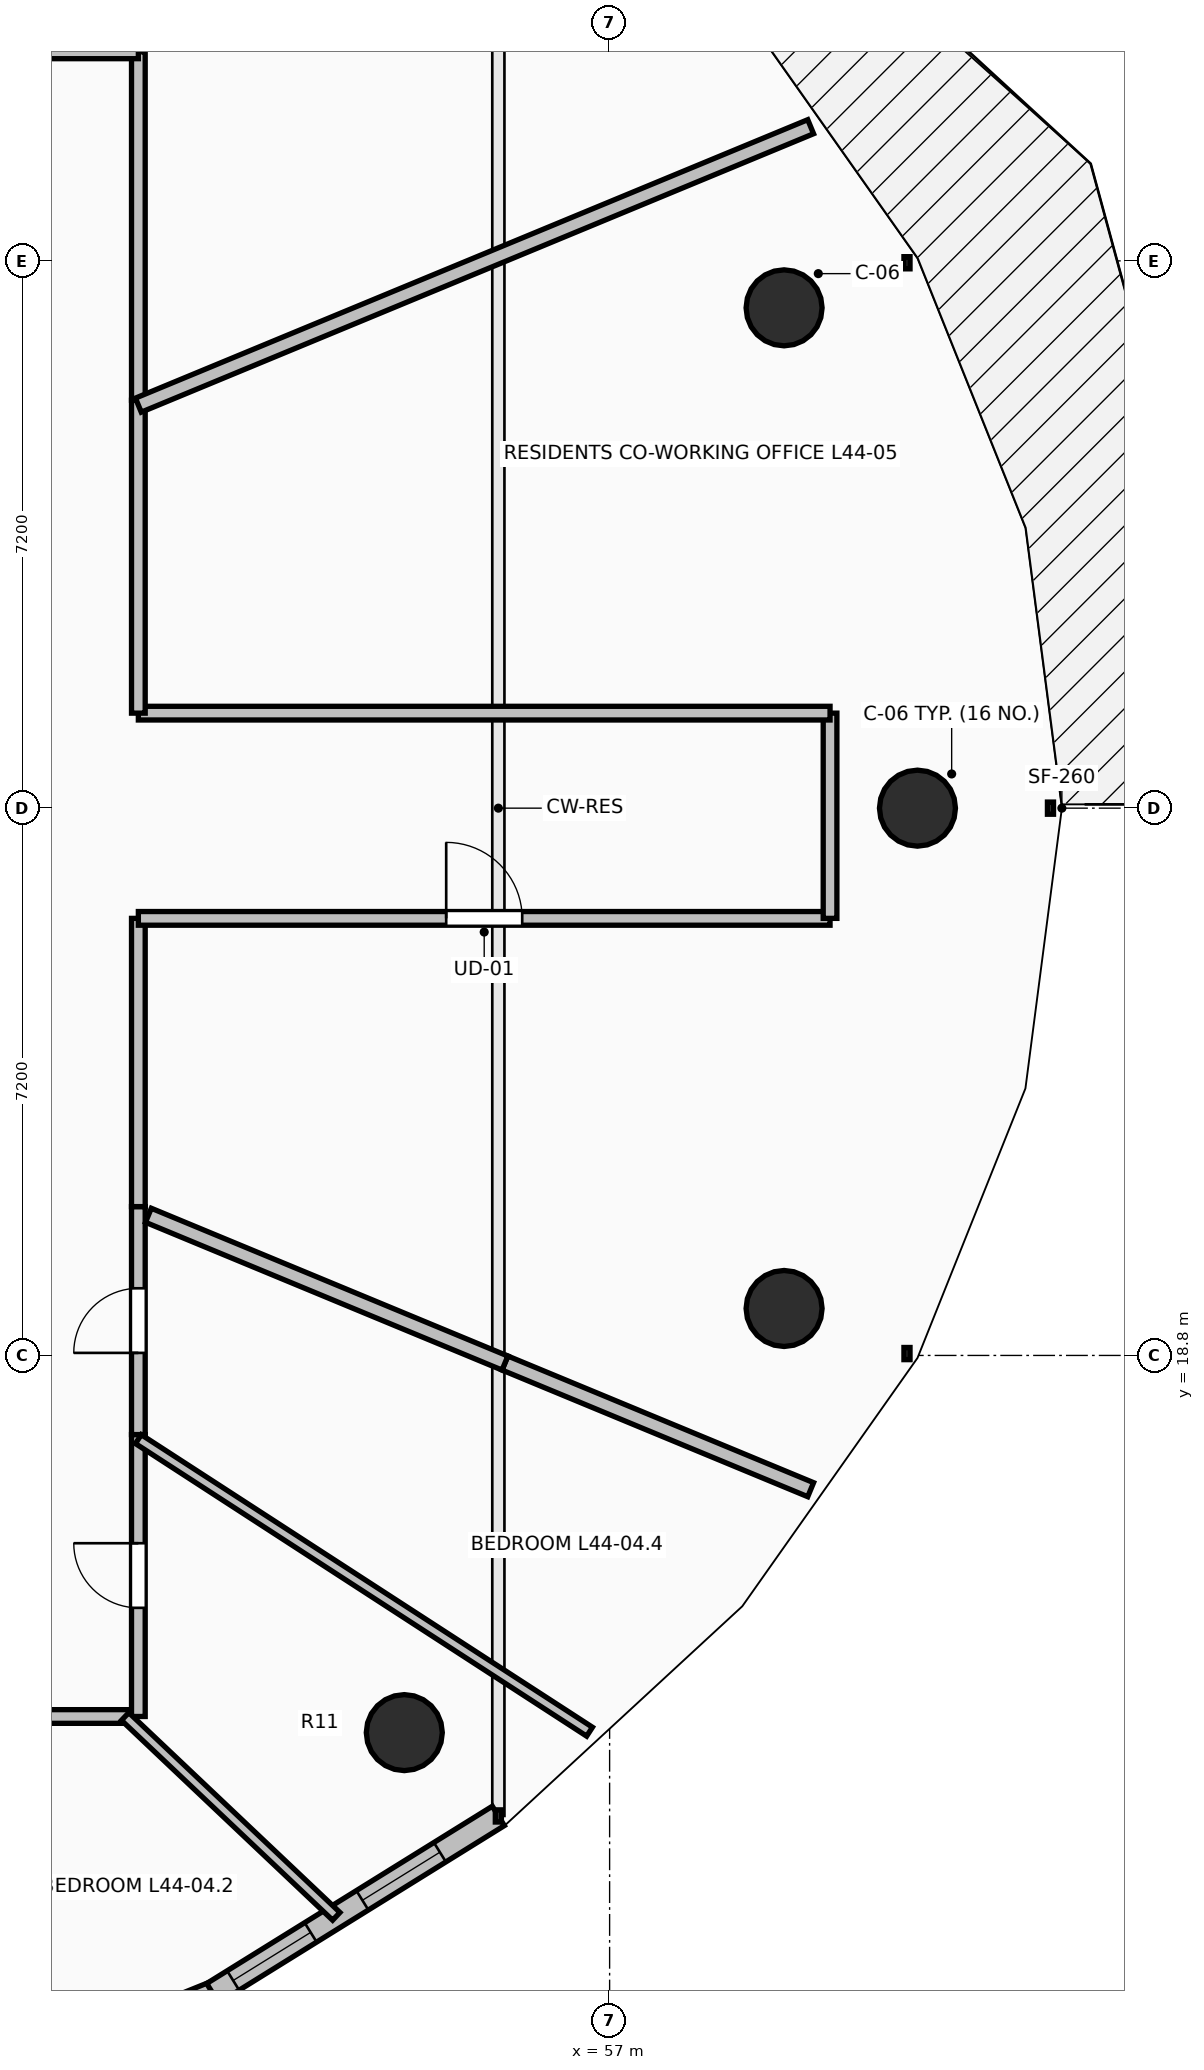
"""IFC4 building model, lengths in metres.
Left out: names, types, materials, properties, quantities, classifications, styles, units other than length and angle.
Written with IfcOpenShell. Run it as: python <this file> out.ifc"""

import sys

from ifc_helpers import new_model, si_unit, direction, frame, frame_2d, origin, origin_2d, place, context, subcontext, project, spatial, rectangle, circle, extrude, element, fill, save


model = new_model("IFC4")
c1 = context("Model", 3, precision=1e-05, world=origin(), true_north=direction((0.0, 1.0)))
c2 = subcontext(c1, "Body", "Model", "MODEL_VIEW")
j1 = project(units=[si_unit("LENGTHUNIT", "METRE"), si_unit("PLANEANGLEUNIT", "RADIAN")], contexts=[c1])
p1 = place(None, origin())
s1 = spatial("IfcSite", under=j1, at=p1, CompositionType="ELEMENT")
p2 = place(p1, origin())
s2 = spatial("IfcBuilding", under=s1, at=p2, CompositionType="ELEMENT")
p3 = place(p2, frame((0.0, 0.0, 164.1)))
s3 = spatial("IfcBuildingStorey", under=s2, at=p3, CompositionType="ELEMENT", Elevation=164.1)
for number, where, z_axis, x_axis in (
    (1, (61.05, 26.0, 0.0), (0.0, 0.0, 1.0), (1.0, 0.0, 0.0)),
    (2, (59.295, 32.582, 0.0), (0.0, 0.0, 1.0), (0.924, 0.383, 0.0)),
    (3, (54.299, 13.838, 0.0), (0.0, 0.0, 1.0), (0.707, -0.707, 0.0)),
    (4, (59.295, 19.418, 0.0), (0.0, 0.0, 1.0), (0.924, -0.383, 0.0)),
):
    element("IfcColumn", number, at=place(p3, frame(where, z_axis=z_axis, x_axis=x_axis)), inside=s3, PredefinedType="COLUMN", context=c2, shape_type="SweptSolid", body=[
        extrude(circle(Radius=0.5, at=origin_2d()), origin(), (0.0, 0.0, 1.0), 3.5),
    ])
p4 = place(p3, frame((47.49, 8.677, 0.0), z_axis=(0.0, 0.0, 1.0), x_axis=(0.927156504392, 0.374674280359, 0.0)))
e5 = element("IfcWall", 5, at=p4, inside=s3, PredefinedType="STANDARD", context=c2, shape_type="SweptSolid", body=[
    extrude(rectangle(XDim=4.625, YDim=0.3, at=frame_2d((2.312, 0.0))), origin(), (0.0, 0.0, 1.0), 3.24),
])
p5 = place(p4, frame((1.03, 0.0, 0.85)))
e6 = element("IfcOpeningElement", 6, at=p5, cuts=e5, PredefinedType="OPENING", context=c2, shape_type="SweptSolid", body=[
    extrude(rectangle(XDim=1.2, YDim=1.95, at=frame_2d((0.6, 0.975))), frame((0.0, 0.165, 0.0), z_axis=(0.0, -1.0, 0.0), x_axis=(1.0, 0.0, 0.0)), (0.0, 0.0, 1.0), 0.33),
])
p6 = place(p3, frame((51.778, 10.41, 0.0), z_axis=(0.0, 0.0, 1.0), x_axis=(0.849721181976, 0.527232313977, 0.0)))
e7 = element("IfcWall", 7, at=p6, inside=s3, PredefinedType="STANDARD", context=c2, shape_type="SweptSolid", body=[
    extrude(rectangle(XDim=4.423, YDim=0.3, at=frame_2d((2.211, 0.0))), origin(), (0.0, 0.0, 1.0), 3.24),
])
p7 = place(p6, frame((0.317, 0.0, 0.85)))
e8 = element("IfcOpeningElement", 8, at=p7, cuts=e7, PredefinedType="OPENING", context=c2, shape_type="SweptSolid", body=[
    extrude(rectangle(XDim=1.2, YDim=1.95, at=frame_2d((0.6, 0.975))), frame((0.0, 0.165, 0.0), z_axis=(0.0, -1.0, 0.0), x_axis=(1.0, 0.0, 0.0)), (0.0, 0.0, 1.0), 0.33),
])
p8 = place(p6, frame((2.318, 0.0, 0.85)))
e9 = element("IfcOpeningElement", 9, at=p8, cuts=e7, PredefinedType="OPENING", context=c2, shape_type="SweptSolid", body=[
    extrude(rectangle(XDim=1.2, YDim=1.95, at=frame_2d((0.6, 0.975))), frame((0.0, 0.165, 0.0), z_axis=(0.0, -1.0, 0.0), x_axis=(1.0, 0.0, 0.0)), (0.0, 0.0, 1.0), 0.33),
])
p9 = place(p3, frame((46.792, 14.05, 0.0), z_axis=(0.0, 0.0, 1.0), x_axis=(1.0, 0.0, 0.0)))
e10 = element("IfcWall", 10, at=p9, inside=s3, PredefinedType="PARTITIONING", context=c2, shape_type="SweptSolid", body=[
    extrude(rectangle(XDim=3.921, YDim=0.18, at=frame_2d((1.96, 0.0))), origin(), (0.0, 0.0, 1.0), 2.432),
])
p10 = place(p9, frame((1.535, 0.0, 0.0)))
e11 = element("IfcOpeningElement", 11, at=p10, cuts=e10, PredefinedType="OPENING", context=c2, shape_type="SweptSolid", body=[
    extrude(rectangle(XDim=0.85, YDim=2.1, at=frame_2d((0.425, 1.05))), frame((0.0, 0.105, 0.0), z_axis=(0.0, -1.0, 0.0), x_axis=(1.0, 0.0, 0.0)), (0.0, 0.0, 1.0), 0.21),
])
p11 = place(p3, frame((50.8, 14.05, 0.0), z_axis=(0.0, 0.0, 1.0), x_axis=(0.0, 1.0, 0.0)))
e12 = element("IfcWall", 12, at=p11, inside=s3, PredefinedType="PARTITIONING", context=c2, shape_type="SweptSolid", body=[
    extrude(rectangle(XDim=3.709, YDim=0.18, at=frame_2d((1.854, 0.0))), origin(), (0.0, 0.0, 1.0), 2.432),
])
p12 = place(p11, frame((1.429, 0.0, 0.0)))
e13 = element("IfcOpeningElement", 13, at=p12, cuts=e12, PredefinedType="OPENING", context=c2, shape_type="SweptSolid", body=[
    extrude(rectangle(XDim=0.85, YDim=2.1, at=frame_2d((0.425, 1.05))), frame((0.0, 0.105, 0.0), z_axis=(0.0, -1.0, 0.0), x_axis=(1.0, 0.0, 0.0)), (0.0, 0.0, 1.0), 0.21),
])
p13 = place(p3, frame((50.8, 17.759, 0.0), z_axis=(0.0, 0.0, 1.0), x_axis=(0.0, 1.0, 0.0)))
e14 = element("IfcWall", 14, at=p13, inside=s3, PredefinedType="PARTITIONING", context=c2, shape_type="SweptSolid", body=[
    extrude(rectangle(XDim=2.999, YDim=0.18, at=frame_2d((1.5, 0.0))), origin(), (0.0, 0.0, 1.0), 3.24),
])
p14 = place(p13, frame((1.074, 0.0, 0.0)))
e15 = element("IfcOpeningElement", 15, at=p14, cuts=e14, PredefinedType="OPENING", context=c2, shape_type="SweptSolid", body=[
    extrude(rectangle(XDim=0.85, YDim=2.1, at=frame_2d((0.425, 1.05))), frame((0.0, 0.105, 0.0), z_axis=(0.0, -1.0, 0.0), x_axis=(1.0, 0.0, 0.0)), (0.0, 0.0, 1.0), 0.21),
])
p15 = place(p3, frame((50.8, 20.758, 0.0), z_axis=(0.0, 0.0, 1.0), x_axis=(0.0, 1.0, 0.0)))
e16 = element("IfcWall", 16, at=p15, inside=s3, PredefinedType="PARTITIONING", context=c2, shape_type="SweptSolid", body=[
    extrude(rectangle(XDim=3.792, YDim=0.18, at=frame_2d((1.896, 0.0))), origin(), (0.0, 0.0, 1.0), 3.24),
])
p16 = place(p3, frame((50.8, 24.55, 0.0), z_axis=(0.0, 0.0, 1.0), x_axis=(1.0, 0.0, 0.0)))
e17 = element("IfcWall", 17, at=p16, inside=s3, PredefinedType="PARTITIONING", context=c2, shape_type="SweptSolid", body=[
    extrude(rectangle(XDim=9.1, YDim=0.18, at=frame_2d((4.55, 0.0))), origin(), (0.0, 0.0, 1.0), 2.432),
])
p17 = place(p16, frame((4.05, 0.0, 0.0)))
e18 = element("IfcOpeningElement", 18, at=p17, cuts=e17, PredefinedType="OPENING", context=c2, shape_type="SweptSolid", body=[
    extrude(rectangle(XDim=1.0, YDim=2.15, at=frame_2d((0.5, 1.075))), frame((0.0, 0.105, 0.0), z_axis=(0.0, -1.0, 0.0), x_axis=(1.0, 0.0, 0.0)), (0.0, 0.0, 1.0), 0.21),
])
p18 = place(p3, frame((59.9, 24.55, 0.0), z_axis=(0.0, 0.0, 1.0), x_axis=(0.0, 1.0, 0.0)))
e19 = element("IfcWall", 19, at=p18, inside=s3, PredefinedType="PARTITIONING", context=c2, shape_type="SweptSolid", body=[
    extrude(rectangle(XDim=2.7, YDim=0.18, at=frame_2d((1.35, 0.0))), origin(), (0.0, 0.0, 1.0), 2.432),
])
p19 = place(p3, frame((59.9, 27.25, 0.0), z_axis=(0.0, 0.0, 1.0), x_axis=(-1.0, 0.0, 0.0)))
e20 = element("IfcWall", 20, at=p19, inside=s3, PredefinedType="PARTITIONING", context=c2, shape_type="SweptSolid", body=[
    extrude(rectangle(XDim=9.1, YDim=0.18, at=frame_2d((4.55, 0.0))), origin(), (0.0, 0.0, 1.0), 2.432),
])
p20 = place(p3, frame((50.8, 27.25, 0.0), z_axis=(0.0, 0.0, 1.0), x_axis=(0.0, 1.0, 0.0)))
e21 = element("IfcWall", 21, at=p20, inside=s3, PredefinedType="PARTITIONING", context=c2, shape_type="SweptSolid", body=[
    extrude(rectangle(XDim=4.117, YDim=0.18, at=frame_2d((2.059, 0.0))), origin(), (0.0, 0.0, 1.0), 2.432),
])
p21 = place(p3, frame((50.8, 31.367, 0.0), z_axis=(0.0, 0.0, 1.0), x_axis=(0.0, 1.0, 0.0)))
e22 = element("IfcWall", 22, at=p21, inside=s3, PredefinedType="PARTITIONING", context=c2, shape_type="SweptSolid", body=[
    extrude(rectangle(XDim=4.583, YDim=0.18, at=frame_2d((2.292, 0.0))), origin(), (0.0, 0.0, 1.0), 2.432),
])
p22 = place(p3, frame((50.8, 35.95, 0.0), z_axis=(0.0, 0.0, 1.0), x_axis=(-1.0, 0.0, 0.0)))
e23 = element("IfcWall", 23, at=p22, inside=s3, PredefinedType="PARTITIONING", context=c2, shape_type="SweptSolid", body=[
    extrude(rectangle(XDim=8.474, YDim=0.18, at=frame_2d((4.237, 0.0))), origin(), (0.0, 0.0, 1.0), 2.432),
])
p23 = place(p22, frame((3.737, 0.0, 0.0)))
e24 = element("IfcOpeningElement", 24, at=p23, cuts=e23, PredefinedType="OPENING", context=c2, shape_type="SweptSolid", body=[
    extrude(rectangle(XDim=1.0, YDim=2.15, at=frame_2d((0.5, 1.075))), frame((0.0, 0.105, 0.0), z_axis=(0.0, -1.0, 0.0), x_axis=(1.0, 0.0, 0.0)), (0.0, 0.0, 1.0), 0.21),
])
p24 = place(p3, frame((49.92, 9.661, 0.0), z_axis=(0.0, 0.0, 1.0), x_axis=(-0.589349395673, 0.807878264233, 0.0)))
e25 = element("IfcWall", 25, at=p24, inside=s3, PredefinedType="PARTITIONING", context=c2, shape_type="SweptSolid", body=[
    extrude(rectangle(XDim=5.433, YDim=0.14, at=frame_2d((2.716, 0.0))), origin(), (0.0, 0.0, 1.0), 2.432),
])
p25 = place(p3, frame((53.404, 11.421, 0.0), z_axis=(0.0, 0.0, 1.0), x_axis=(-0.726306487509, 0.687370996044, 0.0)))
e26 = element("IfcWall", 26, at=p25, inside=s3, PredefinedType="PARTITIONING", context=c2, shape_type="SweptSolid", body=[
    extrude(rectangle(XDim=3.825, YDim=0.14, at=frame_2d((1.913, 0.0))), origin(), (0.0, 0.0, 1.0), 2.728),
])
p26 = place(p3, frame((56.736, 13.85, 0.0), z_axis=(0.0, 0.0, 1.0), x_axis=(-0.839059638195, 0.544039450364, 0.0)))
e27 = element("IfcWall", 27, at=p26, inside=s3, PredefinedType="PARTITIONING", context=c2, shape_type="SweptSolid", body=[
    extrude(rectangle(XDim=7.075, YDim=0.14, at=frame_2d((3.537, 0.0))), origin(), (0.0, 0.0, 1.0), 2.728),
])
p27 = place(p3, frame((59.645, 17.034, 0.0), z_axis=(0.0, 0.0, 1.0), x_axis=(-0.923874659351, 0.382695197002, 0.0)))
e28 = element("IfcWall", 28, at=p27, inside=s3, PredefinedType="PARTITIONING", context=c2, shape_type="SweptSolid", body=[
    extrude(rectangle(XDim=4.353, YDim=0.2, at=frame_2d((2.177, 0.0))), origin(), (0.0, 0.0, 1.0), 2.728),
])
p28 = place(p3, frame((55.623, 18.7, 0.0), z_axis=(0.0, 0.0, 1.0), x_axis=(-0.923813457571, 0.382842912446, 0.0)))
e29 = element("IfcWall", 29, at=p28, inside=s3, PredefinedType="PARTITIONING", context=c2, shape_type="SweptSolid", body=[
    extrude(rectangle(XDim=5.078, YDim=0.2, at=frame_2d((2.539, 0.0))), origin(), (0.0, 0.0, 1.0), 2.886),
])
p29 = place(p3, frame((59.645, 34.965, 0.0), z_axis=(0.0, 0.0, 1.0), x_axis=(-0.923902460479, -0.382628074665, 0.0)))
e30 = element("IfcWall", 30, at=p29, inside=s3, PredefinedType="PARTITIONING", context=c2, shape_type="SweptSolid", body=[
    extrude(rectangle(XDim=9.573, YDim=0.2, at=frame_2d((4.787, 0.0))), origin(), (0.0, 0.0, 1.0), 2.432),
])
p30 = place(p7, origin())
e31 = element("IfcWindow", 31, at=p30, inside=s3, PartitioningType="SINGLE_PANEL", PredefinedType="WINDOW", context=c2, shape_type="SweptSolid", body=[
    extrude(rectangle(XDim=1.2, YDim=1.95, at=frame_2d((0.6, 0.975))), frame((0.0, 0.03, 0.0), z_axis=(0.0, -1.0, 0.0), x_axis=(1.0, 0.0, 0.0)), (0.0, 0.0, 1.0), 0.06),
])
fill(e8, e31)
p31 = place(p8, origin())
e32 = element("IfcWindow", 32, at=p31, inside=s3, PartitioningType="SINGLE_PANEL", PredefinedType="WINDOW", context=c2, shape_type="SweptSolid", body=[
    extrude(rectangle(XDim=1.2, YDim=1.95, at=frame_2d((0.6, 0.975))), frame((0.0, 0.03, 0.0), z_axis=(0.0, -1.0, 0.0), x_axis=(1.0, 0.0, 0.0)), (0.0, 0.0, 1.0), 0.06),
])
fill(e9, e32)
p32 = place(p17, origin())
e33 = element("IfcDoor", 33, at=p32, inside=s3, OperationType="SINGLE_SWING_LEFT", PredefinedType="DOOR", context=c2, shape_type="SweptSolid", body=[
    extrude(rectangle(XDim=1.0, YDim=2.15, at=frame_2d((0.5, 1.075))), frame((0.0, 0.025, 0.0), z_axis=(0.0, -1.0, 0.0), x_axis=(1.0, 0.0, 0.0)), (0.0, 0.0, 1.0), 0.05),
])
fill(e18, e33)
p33 = place(p12, origin())
e34 = element("IfcDoor", 34, at=p33, inside=s3, OperationType="SINGLE_SWING_RIGHT", PredefinedType="DOOR", context=c2, shape_type="SweptSolid", body=[
    extrude(rectangle(XDim=0.85, YDim=2.1, at=frame_2d((0.425, 1.05))), frame((0.0, 0.025, 0.0), z_axis=(0.0, -1.0, 0.0), x_axis=(1.0, 0.0, 0.0)), (0.0, 0.0, 1.0), 0.05),
])
fill(e13, e34)
p34 = place(p14, origin())
e35 = element("IfcDoor", 35, at=p34, inside=s3, OperationType="SINGLE_SWING_LEFT", PredefinedType="DOOR", context=c2, shape_type="SweptSolid", body=[
    extrude(rectangle(XDim=0.85, YDim=2.1, at=frame_2d((0.425, 1.05))), frame((0.0, 0.025, 0.0), z_axis=(0.0, -1.0, 0.0), x_axis=(1.0, 0.0, 0.0)), (0.0, 0.0, 1.0), 0.05),
])
fill(e15, e35)
save(model, sys.argv[1])
